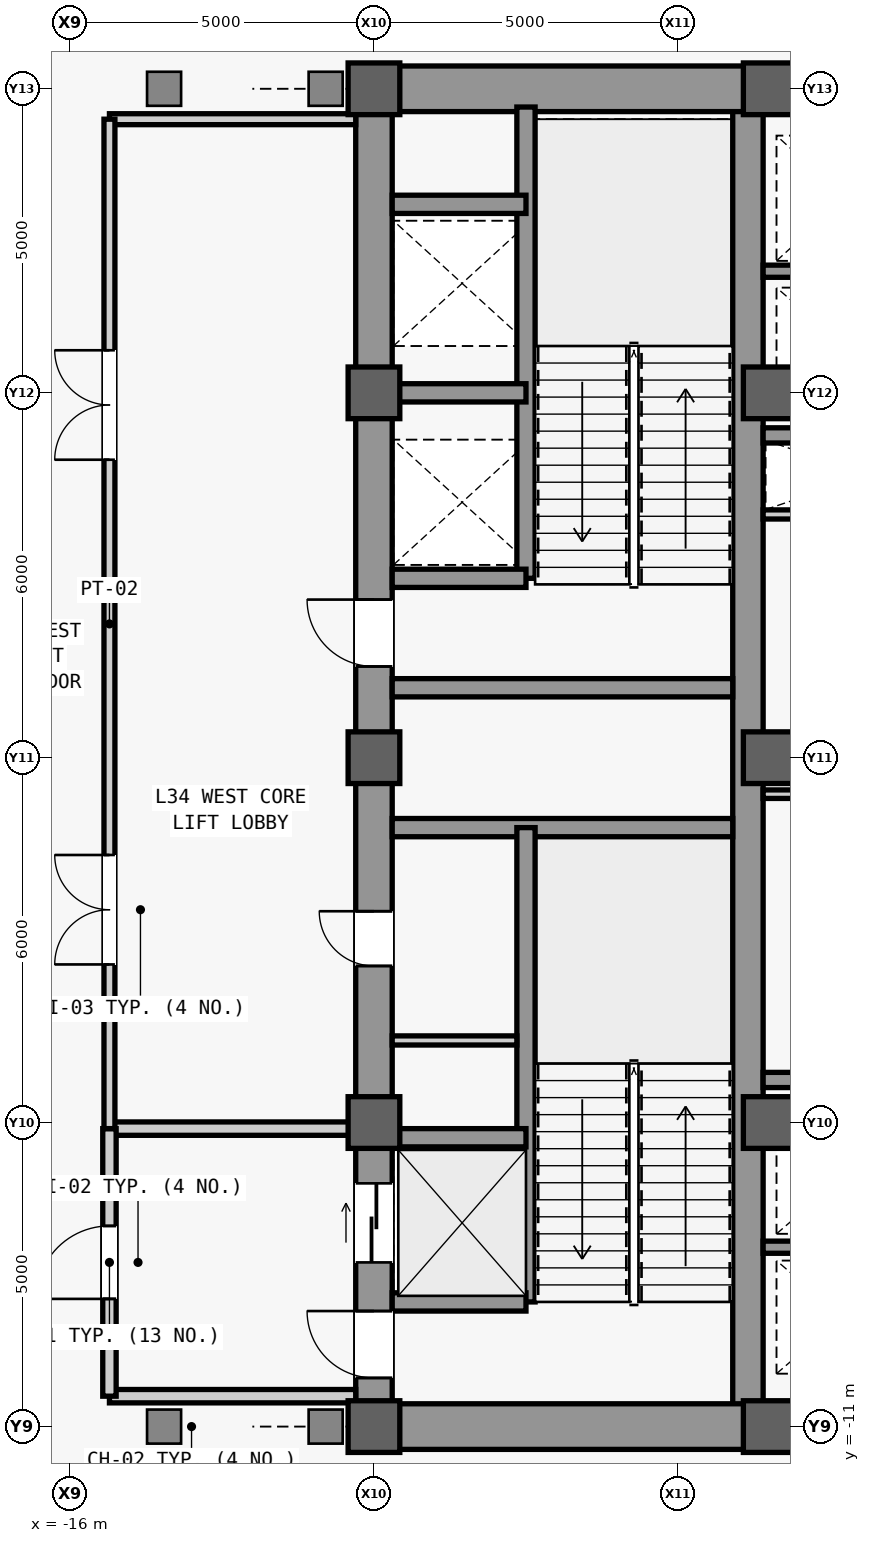
"""IFC4 building model, lengths in metres.
Left out: names, types, materials, properties, quantities, classifications, styles, units other than length and angle.
Written with IfcOpenShell. Run it as: python <this file> out.ifc"""

import sys

from ifc_helpers import new_model, si_unit, direction, frame, frame_2d, origin, origin_2d, place, context, subcontext, project, spatial, rectangle, extrude, source, transform, mapped, element, fill, save


model = new_model("IFC4")
c1 = context("Model", 3, precision=1e-05, world=origin(), true_north=direction((0.0, 1.0)))
c2 = subcontext(c1, "Body", "Model", "MODEL_VIEW")
j1 = project(units=[si_unit("LENGTHUNIT", "METRE"), si_unit("PLANEANGLEUNIT", "RADIAN")], contexts=[c1])
p1 = place(None, origin())
s1 = spatial("IfcSite", under=j1, at=p1, CompositionType="ELEMENT")
p2 = place(p1, origin())
s2 = spatial("IfcBuilding", under=s1, at=p2, CompositionType="ELEMENT")
p3 = place(p2, frame((0.0, 0.0, 149.9)))
s3 = spatial("IfcBuildingStorey", under=s2, at=p3, CompositionType="ELEMENT", Elevation=149.9)
m1 = source(origin(), c2, "Body", "SweptSolid", [
    extrude(rectangle(XDim=22.0, YDim=0.6, at=frame_2d((11.0, 0.0))), origin(), (0.0, 0.0, 1.0), 4.98),
])
p4 = place(p3, frame((-11.0, -11.0, 0.0), z_axis=(0.0, 0.0, 1.0), x_axis=(0.0, 1.0, 0.0)))
e1 = element("IfcWall", 1, at=p4, inside=s3, PredefinedType="SHEAR", context=c2, shape_type="MappedRepresentation", body=[
    mapped(m1, transform((0.0, 0.0, 0.0), scale=1.0)),
])
m2 = source(origin(), c2, "Body", "SweptSolid", [
    extrude(rectangle(XDim=1.1, YDim=2.2, at=frame_2d((0.55, 1.1))), frame((0.0, 0.31, 0.0), z_axis=(0.0, -1.0, 0.0), x_axis=(1.0, 0.0, 0.0)), (0.0, 0.0, 1.0), 0.62),
])
p5 = place(p4, frame((0.8, 0.0, 0.0)))
e2 = element("IfcOpeningElement", 2, at=p5, cuts=e1, PredefinedType="OPENING", context=c2, shape_type="MappedRepresentation", body=[
    mapped(m2, transform((0.0, 0.0, 0.0), scale=1.0)),
])
p6 = place(p4, frame((12.5, 0.0, 0.0)))
e3 = element("IfcOpeningElement", 3, at=p6, cuts=e1, PredefinedType="OPENING", context=c2, shape_type="MappedRepresentation", body=[
    mapped(m2, transform((0.0, 0.0, 0.0), scale=1.0)),
])
m3 = source(origin(), c2, "Body", "SweptSolid", [
    extrude(rectangle(XDim=0.9, YDim=2.15, at=frame_2d((0.45, 1.075))), frame((0.0, 0.31, 0.0), z_axis=(0.0, -1.0, 0.0), x_axis=(1.0, 0.0, 0.0)), (0.0, 0.0, 1.0), 0.62),
])
p7 = place(p4, frame((7.575, 0.0, 0.0)))
e4 = element("IfcOpeningElement", 4, at=p7, cuts=e1, PredefinedType="OPENING", context=c2, shape_type="MappedRepresentation", body=[
    mapped(m3, transform((0.0, 0.0, 0.0), scale=1.0)),
])
m4 = source(origin(), c2, "Body", "SweptSolid", [
    extrude(rectangle(XDim=1.3, YDim=2.3, at=frame_2d((0.65, 1.15))), frame((0.0, 0.31, 0.0), z_axis=(0.0, -1.0, 0.0), x_axis=(1.0, 0.0, 0.0)), (0.0, 0.0, 1.0), 0.62),
])
p8 = place(p4, frame((2.7, 0.0, 0.0)))
e5 = element("IfcOpeningElement", 5, at=p8, cuts=e1, PredefinedType="OPENING", context=c2, shape_type="MappedRepresentation", body=[
    mapped(m4, transform((0.0, 0.0, 0.0), scale=1.0)),
])
m5 = source(origin(), c2, "Body", "SweptSolid", [
    extrude(rectangle(XDim=21.4, YDim=0.5, at=frame_2d((10.7, 0.0))), origin(), (0.0, 0.0, 1.0), 4.98),
])
p9 = place(p3, frame((-4.85, -10.7, 0.0), z_axis=(0.0, 0.0, 1.0), x_axis=(0.0, 1.0, 0.0)))
e6 = element("IfcWall", 6, at=p9, inside=s3, PredefinedType="SHEAR", context=c2, shape_type="MappedRepresentation", body=[
    mapped(m5, transform((0.0, 0.0, 0.0), scale=1.0)),
])
m6 = source(origin(), c2, "Body", "SweptSolid", [
    extrude(rectangle(XDim=5.85, YDim=0.75, at=frame_2d((2.925, 0.0))), origin(), (0.0, 0.0, 1.0), 4.98),
])
for number, where, z_axis, x_axis in (
    (7, (-10.7, -11.0, 0.0), (0.0, 0.0, 1.0), (1.0, 0.0, 0.0)),
    (8, (-10.7, 11.0, 0.0), (0.0, 0.0, 1.0), (1.0, 0.0, 0.0)),
):
    element("IfcWall", number, at=place(p3, frame(where, z_axis=z_axis, x_axis=x_axis)), inside=s3, PredefinedType="SHEAR", context=c2, shape_type="MappedRepresentation", body=[
        mapped(m6, transform((0.0, 0.0, 0.0), scale=1.0)),
    ])
m7 = source(origin(), c2, "Body", "SweptSolid", [
    extrude(rectangle(XDim=5.6, YDim=0.3, at=frame_2d((2.8, 0.0))), origin(), (0.0, 0.0, 1.0), 4.98),
])
for number, where, z_axis, x_axis in (
    (9, (-10.7, -1.15, 0.0), (0.0, 0.0, 1.0), (1.0, 0.0, 0.0)),
    (10, (-10.7, 1.15, 0.0), (0.0, 0.0, 1.0), (1.0, 0.0, 0.0)),
):
    element("IfcWall", number, at=place(p3, frame(where, z_axis=z_axis, x_axis=x_axis)), inside=s3, PredefinedType="SHEAR", context=c2, shape_type="MappedRepresentation", body=[
        mapped(m7, transform((0.0, 0.0, 0.0), scale=1.0)),
    ])
m8 = source(origin(), c2, "Body", "SweptSolid", [
    extrude(rectangle(XDim=9.2, YDim=0.5, at=frame_2d((4.6, 0.0))), origin(), (0.0, 0.0, 1.0), 4.98),
])
p10 = place(p3, frame((-4.6, -11.0, 0.0), z_axis=(0.0, 0.0, 1.0), x_axis=(1.0, 0.0, 0.0)))
e11 = element("IfcWall", 11, at=p10, inside=s3, PredefinedType="SHEAR", context=c2, shape_type="MappedRepresentation", body=[
    mapped(m8, transform((0.0, 0.0, 0.0), scale=1.0)),
])
m9 = source(origin(), c2, "Body", "SweptSolid", [
    extrude(rectangle(XDim=1.8, YDim=2.25, at=frame_2d((0.9, 1.125))), frame((0.0, 0.26, 0.0), z_axis=(0.0, -1.0, 0.0), x_axis=(1.0, 0.0, 0.0)), (0.0, 0.0, 1.0), 0.52),
])
p11 = place(p10, frame((3.7, 0.0, 0.0)))
e12 = element("IfcOpeningElement", 12, at=p11, cuts=e11, PredefinedType="OPENING", context=c2, shape_type="MappedRepresentation", body=[
    mapped(m9, transform((0.0, 0.0, 0.0), scale=1.0)),
])
p12 = place(p3, frame((-4.6, 11.0, 0.0), z_axis=(0.0, 0.0, 1.0), x_axis=(1.0, 0.0, 0.0)))
e13 = element("IfcWall", 13, at=p12, inside=s3, PredefinedType="SHEAR", context=c2, shape_type="MappedRepresentation", body=[
    mapped(m8, transform((0.0, 0.0, 0.0), scale=1.0)),
])
p13 = place(p12, frame((3.7, 0.0, 0.0)))
e14 = element("IfcOpeningElement", 14, at=p13, cuts=e13, PredefinedType="OPENING", context=c2, shape_type="MappedRepresentation", body=[
    mapped(m9, transform((0.0, 0.0, 0.0), scale=1.0)),
])
m10 = source(origin(), c2, "Body", "SweptSolid", [
    extrude(rectangle(XDim=0.85, YDim=0.85, at=origin_2d()), origin(), (0.0, 0.0, 1.0), 5.2),
])
for number, where, z_axis, x_axis in (
    (15, (-11.0, -11.0, 0.0), (0.0, 0.0, 1.0), (1.0, 0.0, 0.0)),
    (16, (-11.0, -6.0, 0.0), (0.0, 0.0, 1.0), (1.0, 0.0, 0.0)),
    (17, (-11.0, 0.0, 0.0), (0.0, 0.0, 1.0), (1.0, 0.0, 0.0)),
    (18, (-11.0, 6.0, 0.0), (0.0, 0.0, 1.0), (1.0, 0.0, 0.0)),
    (19, (-11.0, 11.0, 0.0), (0.0, 0.0, 1.0), (1.0, 0.0, 0.0)),
    (20, (-4.5, -11.0, 0.0), (0.0, 0.0, 1.0), (1.0, 0.0, 0.0)),
    (21, (-4.5, -6.0, 0.0), (0.0, 0.0, 1.0), (1.0, 0.0, 0.0)),
    (22, (-4.5, 0.0, 0.0), (0.0, 0.0, 1.0), (1.0, 0.0, 0.0)),
    (23, (-4.5, 6.0, 0.0), (0.0, 0.0, 1.0), (1.0, 0.0, 0.0)),
    (24, (-4.5, 11.0, 0.0), (0.0, 0.0, 1.0), (1.0, 0.0, 0.0)),
):
    element("IfcColumn", number, at=place(p3, frame(where, z_axis=z_axis, x_axis=x_axis)), inside=s3, PredefinedType="COLUMN", context=c2, shape_type="MappedRepresentation", body=[
        mapped(m10, transform((0.0, 0.0, 0.0), scale=1.0)),
    ])
m11 = source(origin(), c2, "Body", "SweptSolid", [
    extrude(rectangle(XDim=7.8, YDim=0.3, at=frame_2d((3.9, 0.0))), origin(), (0.0, 0.0, 1.0), 4.98),
])
p14 = place(p3, frame((-8.5, -8.95, 0.0), z_axis=(0.0, 0.0, 1.0), x_axis=(0.0, 1.0, 0.0)))
e25 = element("IfcWall", 25, at=p14, inside=s3, PredefinedType="SHEAR", context=c2, shape_type="MappedRepresentation", body=[
    mapped(m11, transform((0.0, 0.0, 0.0), scale=1.0)),
])
m12 = source(origin(), c2, "Body", "SweptSolid", [
    extrude(rectangle(XDim=2.2, YDim=0.3, at=frame_2d((1.1, 0.0))), origin(), (0.0, 0.0, 1.0), 4.98),
])
for number, where, z_axis, x_axis in (
    (26, (-10.7, -8.95, 0.0), (0.0, 0.0, 1.0), (1.0, 0.0, 0.0)),
    (27, (-10.7, -6.25, 0.0), (0.0, 0.0, 1.0), (1.0, 0.0, 0.0)),
):
    element("IfcWall", number, at=place(p3, frame(where, z_axis=z_axis, x_axis=x_axis)), inside=s3, PredefinedType="SHEAR", context=c2, shape_type="MappedRepresentation", body=[
        mapped(m12, transform((0.0, 0.0, 0.0), scale=1.0)),
    ])
m13 = source(origin(), c2, "Body", "SweptSolid", [
    extrude(rectangle(XDim=7.75, YDim=0.3, at=frame_2d((3.875, 0.0))), origin(), (0.0, 0.0, 1.0), 4.98),
])
p15 = place(p3, frame((-8.5, 2.95, 0.0), z_axis=(0.0, 0.0, 1.0), x_axis=(0.0, 1.0, 0.0)))
e28 = element("IfcWall", 28, at=p15, inside=s3, PredefinedType="SHEAR", context=c2, shape_type="MappedRepresentation", body=[
    mapped(m13, transform((0.0, 0.0, 0.0), scale=1.0)),
])
for number, where, z_axis, x_axis in (
    (29, (-10.7, 2.95, 0.0), (0.0, 0.0, 1.0), (1.0, 0.0, 0.0)),
    (30, (-10.7, 6.0, 0.0), (0.0, 0.0, 1.0), (1.0, 0.0, 0.0)),
    (31, (-10.7, 9.1, 0.0), (0.0, 0.0, 1.0), (1.0, 0.0, 0.0)),
):
    element("IfcWall", number, at=place(p3, frame(where, z_axis=z_axis, x_axis=x_axis)), inside=s3, PredefinedType="SHEAR", context=c2, shape_type="MappedRepresentation", body=[
        mapped(m12, transform((0.0, 0.0, 0.0), scale=1.0)),
    ])
m14 = source(origin(), c2, "Body", "SweptSolid", [
    extrude(rectangle(XDim=2.05, YDim=0.15, at=frame_2d((1.025, 0.0))), origin(), (0.0, 0.0, 1.0), 4.98),
])
p16 = place(p3, frame((-10.7, -4.65, 0.0), z_axis=(0.0, 0.0, 1.0), x_axis=(1.0, 0.0, 0.0)))
e32 = element("IfcWall", 32, at=p16, inside=s3, PredefinedType="PARTITIONING", context=c2, shape_type="MappedRepresentation", body=[
    mapped(m14, transform((0.0, 0.0, 0.0), scale=1.0)),
])
m15 = source(origin(), c2, "Body", "SweptSolid", [
    extrude(rectangle(XDim=4.05, YDim=0.22, at=frame_2d((2.025, 0.0))), origin(), (0.0, 0.0, 1.0), 4.98),
])
p17 = place(p3, frame((-15.35, -10.5, 0.0), z_axis=(0.0, 0.0, 1.0), x_axis=(1.0, 0.0, 0.0)))
e33 = element("IfcWall", 33, at=p17, inside=s3, PredefinedType="PARTITIONING", context=c2, shape_type="MappedRepresentation", body=[
    mapped(m15, transform((0.0, 0.0, 0.0), scale=1.0)),
])
m16 = source(origin(), c2, "Body", "SweptSolid", [
    extrude(rectangle(XDim=4.05, YDim=0.22, at=frame_2d((2.025, 0.0))), origin(), (0.0, 0.0, 1.0), 4.207),
])
p18 = place(p3, frame((-15.35, -6.1, 0.0), z_axis=(0.0, 0.0, 1.0), x_axis=(1.0, 0.0, 0.0)))
e34 = element("IfcWall", 34, at=p18, inside=s3, PredefinedType="PARTITIONING", context=c2, shape_type="MappedRepresentation", body=[
    mapped(m16, transform((0.0, 0.0, 0.0), scale=1.0)),
])
m17 = source(origin(), c2, "Body", "SweptSolid", [
    extrude(rectangle(XDim=4.4, YDim=0.22, at=frame_2d((2.2, 0.0))), origin(), (0.0, 0.0, 1.0), 4.98),
])
p19 = place(p3, frame((-15.35, -10.5, 0.0), z_axis=(0.0, 0.0, 1.0), x_axis=(0.0, 1.0, 0.0)))
e35 = element("IfcWall", 35, at=p19, inside=s3, PredefinedType="PARTITIONING", context=c2, shape_type="MappedRepresentation", body=[
    mapped(m17, transform((0.0, 0.0, 0.0), scale=1.0)),
])
m18 = source(origin(), c2, "Body", "SweptSolid", [
    extrude(rectangle(XDim=1.2, YDim=2.2, at=frame_2d((0.6, 1.1))), frame((0.0, 0.12, 0.0), z_axis=(0.0, -1.0, 0.0), x_axis=(1.0, 0.0, 0.0)), (0.0, 0.0, 1.0), 0.24),
])
p20 = place(p19, frame((1.6, 0.0, 0.0)))
e36 = element("IfcOpeningElement", 36, at=p20, cuts=e35, PredefinedType="OPENING", context=c2, shape_type="MappedRepresentation", body=[
    mapped(m18, transform((0.0, 0.0, 0.0), scale=1.0)),
])
m19 = source(origin(), c2, "Body", "SweptSolid", [
    extrude(rectangle(XDim=4.05, YDim=0.18, at=frame_2d((2.025, 0.0))), origin(), (0.0, 0.0, 1.0), 4.98),
])
p21 = place(p3, frame((-15.35, 10.5, 0.0), z_axis=(0.0, 0.0, 1.0), x_axis=(1.0, 0.0, 0.0)))
e37 = element("IfcWall", 37, at=p21, inside=s3, PredefinedType="PARTITIONING", context=c2, shape_type="MappedRepresentation", body=[
    mapped(m19, transform((0.0, 0.0, 0.0), scale=1.0)),
])
m20 = source(origin(), c2, "Body", "SweptSolid", [
    extrude(rectangle(XDim=16.6, YDim=0.18, at=frame_2d((8.3, 0.0))), origin(), (0.0, 0.0, 1.0), 4.98),
])
p22 = place(p3, frame((-15.35, -6.1, 0.0), z_axis=(0.0, 0.0, 1.0), x_axis=(0.0, 1.0, 0.0)))
e38 = element("IfcWall", 38, at=p22, inside=s3, PredefinedType="PARTITIONING", context=c2, shape_type="MappedRepresentation", body=[
    mapped(m20, transform((0.0, 0.0, 0.0), scale=1.0)),
])
m21 = source(origin(), c2, "Body", "SweptSolid", [
    extrude(rectangle(XDim=1.8, YDim=2.25, at=frame_2d((0.9, 1.125))), frame((0.0, 0.1, 0.0), z_axis=(0.0, -1.0, 0.0), x_axis=(1.0, 0.0, 0.0)), (0.0, 0.0, 1.0), 0.2),
])
p23 = place(p22, frame((2.7, 0.0, 0.0)))
e39 = element("IfcOpeningElement", 39, at=p23, cuts=e38, PredefinedType="OPENING", context=c2, shape_type="MappedRepresentation", body=[
    mapped(m21, transform((0.0, 0.0, 0.0), scale=1.0)),
])
p24 = place(p22, frame((11.0, 0.0, 0.0)))
e40 = element("IfcOpeningElement", 40, at=p24, cuts=e38, PredefinedType="OPENING", context=c2, shape_type="MappedRepresentation", body=[
    mapped(m21, transform((0.0, 0.0, 0.0), scale=1.0)),
])
m22 = source(origin(), c2, "Body", "SweptSolid", [
    extrude(rectangle(XDim=3.45, YDim=0.15, at=frame_2d((1.725, 0.0))), origin(), (0.0, 0.0, 1.0), 4.98),
])
p25 = place(p3, frame((-4.6, 4.0, 0.0), z_axis=(0.0, 0.0, 1.0), x_axis=(1.0, 0.0, 0.0)))
e41 = element("IfcWall", 41, at=p25, inside=s3, PredefinedType="PARTITIONING", context=c2, shape_type="MappedRepresentation", body=[
    mapped(m22, transform((0.0, 0.0, 0.0), scale=1.0)),
])
m23 = source(origin(), c2, "Body", "SweptSolid", [
    extrude(rectangle(XDim=2.45, YDim=0.2, at=frame_2d((1.225, 0.0))), origin(), (0.0, 0.0, 1.0), 4.98),
])
p26 = place(p3, frame((-4.6, -8.05, 0.0), z_axis=(0.0, 0.0, 1.0), x_axis=(1.0, 0.0, 0.0)))
e42 = element("IfcWall", 42, at=p26, inside=s3, PredefinedType="SHEAR", context=c2, shape_type="MappedRepresentation", body=[
    mapped(m23, transform((0.0, 0.0, 0.0), scale=1.0)),
])
m24 = source(origin(), c2, "Body", "SweptSolid", [
    extrude(rectangle(XDim=9.2, YDim=0.25, at=frame_2d((4.6, 0.0))), origin(), (0.0, 0.0, 1.0), 4.98),
])
p27 = place(p3, frame((-4.6, -5.3, 0.0), z_axis=(0.0, 0.0, 1.0), x_axis=(1.0, 0.0, 0.0)))
e43 = element("IfcWall", 43, at=p27, inside=s3, PredefinedType="SHEAR", context=c2, shape_type="MappedRepresentation", body=[
    mapped(m24, transform((0.0, 0.0, 0.0), scale=1.0)),
])
m25 = source(origin(), c2, "Body", "SweptSolid", [
    extrude(rectangle(XDim=1.05, YDim=2.2, at=frame_2d((0.525, 1.1))), frame((0.0, 0.135, 0.0), z_axis=(0.0, -1.0, 0.0), x_axis=(1.0, 0.0, 0.0)), (0.0, 0.0, 1.0), 0.27),
])
p28 = place(p27, frame((4.075, 0.0, 0.0)))
e44 = element("IfcOpeningElement", 44, at=p28, cuts=e43, PredefinedType="OPENING", context=c2, shape_type="MappedRepresentation", body=[
    mapped(m25, transform((0.0, 0.0, 0.0), scale=1.0)),
])
p29 = place(p3, frame((-4.6, 8.0, 0.0), z_axis=(0.0, 0.0, 1.0), x_axis=(1.0, 0.0, 0.0)))
e45 = element("IfcWall", 45, at=p29, inside=s3, PredefinedType="SHEAR", context=c2, shape_type="MappedRepresentation", body=[
    mapped(m23, transform((0.0, 0.0, 0.0), scale=1.0)),
])
p30 = place(p3, frame((-4.6, 5.3, 0.0), z_axis=(0.0, 0.0, 1.0), x_axis=(1.0, 0.0, 0.0)))
e46 = element("IfcWall", 46, at=p30, inside=s3, PredefinedType="SHEAR", context=c2, shape_type="MappedRepresentation", body=[
    mapped(m24, transform((0.0, 0.0, 0.0), scale=1.0)),
])
p31 = place(p30, frame((4.075, 0.0, 0.0)))
e47 = element("IfcOpeningElement", 47, at=p31, cuts=e46, PredefinedType="OPENING", context=c2, shape_type="MappedRepresentation", body=[
    mapped(m25, transform((0.0, 0.0, 0.0), scale=1.0)),
])
m26 = source(origin(), c2, "Body", "SweptSolid", [
    extrude(rectangle(XDim=3.45, YDim=0.14, at=frame_2d((1.725, 0.0))), origin(), (0.0, 0.0, 1.0), 4.98),
])
p32 = place(p3, frame((-4.6, -0.6, 0.0), z_axis=(0.0, 0.0, 1.0), x_axis=(1.0, 0.0, 0.0)))
e48 = element("IfcWall", 48, at=p32, inside=s3, PredefinedType="PARTITIONING", context=c2, shape_type="MappedRepresentation", body=[
    mapped(m26, transform((0.0, 0.0, 0.0), scale=1.0)),
])
m27 = source(origin(), c2, "Body", "SweptSolid", [
    extrude(rectangle(XDim=1.1, YDim=2.2, at=frame_2d((0.55, 1.1))), frame((0.0, 0.025, 0.0), z_axis=(0.0, -1.0, 0.0), x_axis=(1.0, 0.0, 0.0)), (0.0, 0.0, 1.0), 0.05),
])
p33 = place(p5, origin())
e49 = element("IfcDoor", 49, at=p33, inside=s3, OperationType="SINGLE_SWING_RIGHT", PredefinedType="DOOR", context=c2, shape_type="MappedRepresentation", body=[
    mapped(m27, transform((0.0, 0.0, 0.0), scale=1.0)),
])
fill(e2, e49)
p34 = place(p6, origin())
e50 = element("IfcDoor", 50, at=p34, inside=s3, OperationType="SINGLE_SWING_RIGHT", PredefinedType="DOOR", context=c2, shape_type="MappedRepresentation", body=[
    mapped(m27, transform((0.0, 0.0, 0.0), scale=1.0)),
])
fill(e3, e50)
m28 = source(origin(), c2, "Body", "SweptSolid", [
    extrude(rectangle(XDim=0.9, YDim=2.15, at=frame_2d((0.45, 1.075))), frame((0.0, 0.025, 0.0), z_axis=(0.0, -1.0, 0.0), x_axis=(1.0, 0.0, 0.0)), (0.0, 0.0, 1.0), 0.05),
])
p35 = place(p7, origin())
e51 = element("IfcDoor", 51, at=p35, inside=s3, OperationType="SINGLE_SWING_RIGHT", PredefinedType="DOOR", context=c2, shape_type="MappedRepresentation", body=[
    mapped(m28, transform((0.0, 0.0, 0.0), scale=1.0)),
])
fill(e4, e51)
m29 = source(origin(), c2, "Body", "SweptSolid", [
    extrude(rectangle(XDim=1.2, YDim=2.2, at=frame_2d((0.6, 1.1))), frame((0.0, 0.025, 0.0), z_axis=(0.0, -1.0, 0.0), x_axis=(1.0, 0.0, 0.0)), (0.0, 0.0, 1.0), 0.05),
])
p36 = place(p20, origin())
e52 = element("IfcDoor", 52, at=p36, inside=s3, OperationType="SINGLE_SWING_LEFT", PredefinedType="DOOR", context=c2, shape_type="MappedRepresentation", body=[
    mapped(m29, transform((0.0, 0.0, 0.0), scale=1.0)),
])
fill(e36, e52)
m30 = source(origin(), c2, "Body", "SweptSolid", [
    extrude(rectangle(XDim=1.8, YDim=2.25, at=frame_2d((0.9, 1.125))), frame((0.0, 0.025, 0.0), z_axis=(0.0, -1.0, 0.0), x_axis=(1.0, 0.0, 0.0)), (0.0, 0.0, 1.0), 0.05),
])
p37 = place(p23, origin())
e53 = element("IfcDoor", 53, at=p37, inside=s3, OperationType="SINGLE_SWING_LEFT", PredefinedType="DOOR", context=c2, shape_type="MappedRepresentation", body=[
    mapped(m30, transform((0.0, 0.0, 0.0), scale=1.0)),
])
fill(e39, e53)
p38 = place(p24, origin())
e54 = element("IfcDoor", 54, at=p38, inside=s3, OperationType="SINGLE_SWING_RIGHT", PredefinedType="DOOR", context=c2, shape_type="MappedRepresentation", body=[
    mapped(m30, transform((0.0, 0.0, 0.0), scale=1.0)),
])
fill(e40, e54)
m31 = source(origin(), c2, "Body", "SweptSolid", [
    extrude(rectangle(XDim=1.3, YDim=2.3, at=frame_2d((0.65, 1.15))), frame((0.0, 0.025, 0.0), z_axis=(0.0, -1.0, 0.0), x_axis=(1.0, 0.0, 0.0)), (0.0, 0.0, 1.0), 0.05),
])
p39 = place(p8, origin())
e55 = element("IfcDoor", 55, at=p39, inside=s3, OperationType="SLIDING_TO_LEFT", PredefinedType="DOOR", context=c2, shape_type="MappedRepresentation", body=[
    mapped(m31, transform((0.0, 0.0, 0.0), scale=1.0)),
])
fill(e5, e55)
save(model, sys.argv[1])
